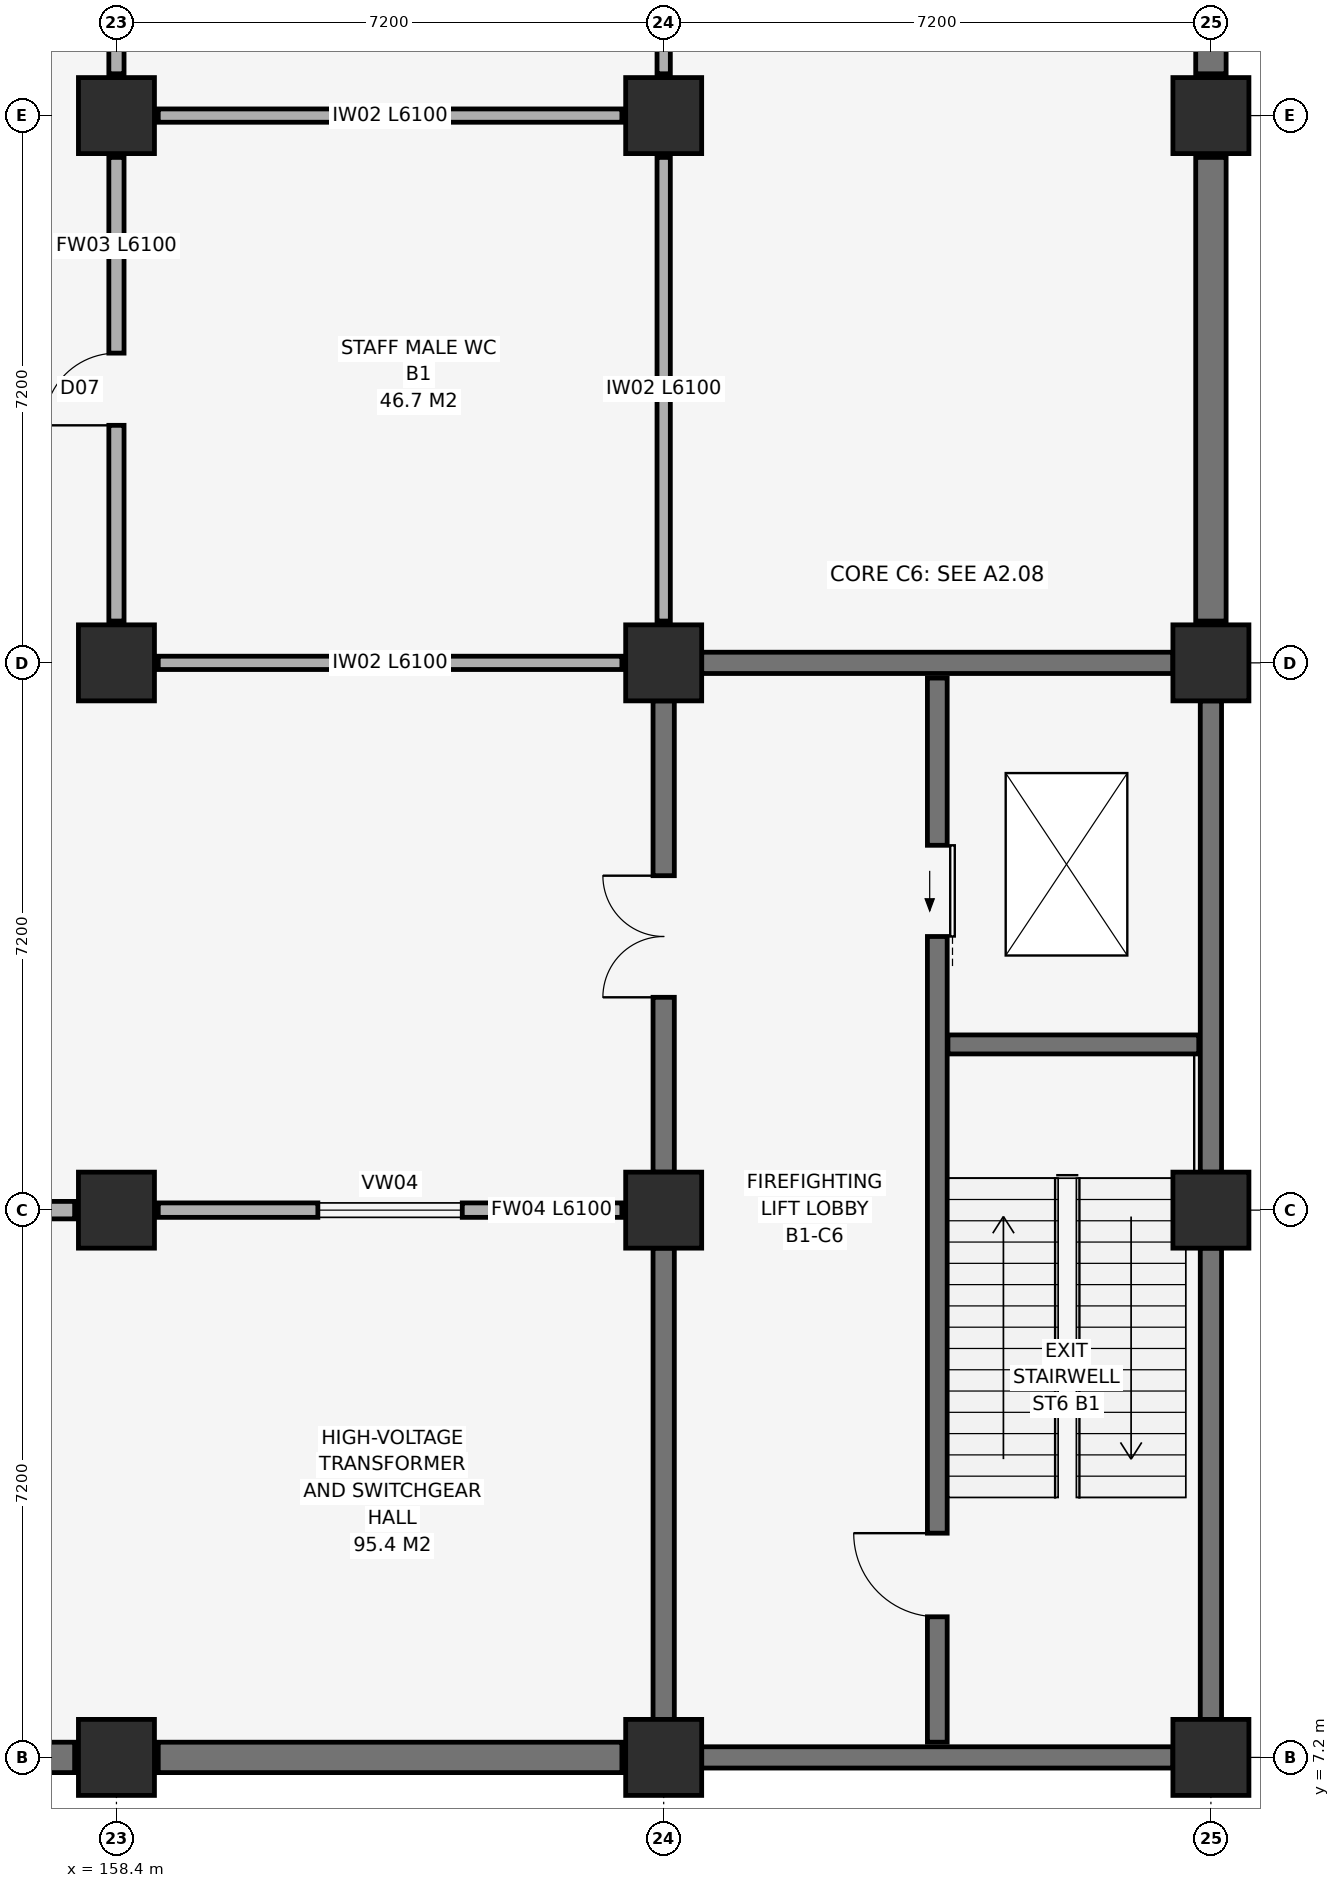
"""IFC4 building model, lengths in metres.
Left out: names, types, materials, properties, quantities, classifications, styles, units other than length and angle.
Written with IfcOpenShell. Run it as: python <this file> out.ifc"""

import sys

from ifc_helpers import new_model, si_unit, direction, frame, frame_2d, origin, origin_2d, place, context, subcontext, project, spatial, rectangle, extrude, element, fill, save


model = new_model("IFC4")
c1 = context("Model", 3, precision=1e-05, world=origin(), true_north=direction((0.0, 1.0)))
c2 = subcontext(c1, "Body", "Model", "MODEL_VIEW")
j1 = project(units=[si_unit("LENGTHUNIT", "METRE"), si_unit("PLANEANGLEUNIT", "RADIAN")], contexts=[c1])
p1 = place(None, origin())
s1 = spatial("IfcSite", under=j1, at=p1, CompositionType="ELEMENT")
p2 = place(p1, origin())
s2 = spatial("IfcBuilding", under=s1, at=p2, CompositionType="ELEMENT")
p3 = place(p2, frame((0.0, 0.0, -5.4)))
s3 = spatial("IfcBuildingStorey", under=s2, at=p3, CompositionType="ELEMENT", Elevation=-5.4)
for number, where, z_axis, x_axis in (
    (1, (158.4, 7.2, -0.45), (0.0, 0.0, 1.0), (1.0, 0.0, 0.0)),
    (2, (158.4, 14.4, -0.45), (0.0, 0.0, 1.0), (1.0, 0.0, 0.0)),
    (3, (158.4, 21.6, -0.45), (0.0, 0.0, 1.0), (1.0, 0.0, 0.0)),
    (4, (158.4, 28.8, -0.45), (0.0, 0.0, 1.0), (1.0, 0.0, 0.0)),
    (5, (165.6, 7.2, -0.45), (0.0, 0.0, 1.0), (1.0, 0.0, 0.0)),
    (6, (165.6, 14.4, -0.45), (0.0, 0.0, 1.0), (1.0, 0.0, 0.0)),
    (7, (165.6, 21.6, -0.45), (0.0, 0.0, 1.0), (1.0, 0.0, 0.0)),
    (8, (165.6, 28.8, -0.45), (0.0, 0.0, 1.0), (1.0, 0.0, 0.0)),
    (9, (172.8, 7.2, -0.45), (0.0, 0.0, 1.0), (1.0, 0.0, 0.0)),
    (10, (172.8, 14.4, -0.45), (0.0, 0.0, 1.0), (1.0, 0.0, 0.0)),
    (11, (172.8, 21.6, -0.45), (0.0, 0.0, 1.0), (1.0, 0.0, 0.0)),
    (12, (172.8, 28.8, -0.45), (0.0, 0.0, 1.0), (1.0, 0.0, 0.0)),
):
    element("IfcColumn", number, at=place(p3, frame(where, z_axis=z_axis, x_axis=x_axis)), inside=s3, PredefinedType="COLUMN", context=c2, shape_type="SweptSolid", body=[
        extrude(rectangle(XDim=1.0, YDim=1.0, at=origin_2d()), origin(), (0.0, 0.0, 1.0), 5.85),
    ])
for number, where, z_axis, x_axis in (
    (13, (151.75, 7.2, 0.0), (0.0, 0.0, 1.0), (1.0, 0.0, 0.0)),
    (14, (158.95, 7.2, 0.0), (0.0, 0.0, 1.0), (1.0, 0.0, 0.0)),
    (15, (172.8, 22.15, 0.0), (0.0, 0.0, 1.0), (0.0, 1.0, 0.0)),
):
    element("IfcWall", number, at=place(p3, frame(where, z_axis=z_axis, x_axis=x_axis)), inside=s3, PredefinedType="USERDEFINED", context=c2, shape_type="SweptSolid", body=[
        extrude(rectangle(XDim=6.1, YDim=0.4, at=frame_2d((3.05, 0.0))), origin(), (0.0, 0.0, 1.0), 5.12),
    ])
p4 = place(p3, frame((172.8, 29.35, 0.0), z_axis=(0.0, 0.0, 1.0), x_axis=(0.0, 1.0, 0.0)))
e16 = element("IfcWall", 16, at=p4, inside=s3, PredefinedType="USERDEFINED", context=c2, shape_type="SweptSolid", body=[
    extrude(rectangle(XDim=6.1, YDim=0.4, at=frame_2d((3.05, 0.0))), origin(), (0.0, 0.0, 1.0), 5.12),
])
for number, where, z_axis, x_axis in (
    (17, (166.1, 7.2, 0.0), (0.0, 0.0, 1.0), (1.0, 0.0, 0.0)),
    (18, (166.1, 21.6, 0.0), (0.0, 0.0, 1.0), (1.0, 0.0, 0.0)),
    (19, (165.6, 7.7, 0.0), (0.0, 0.0, 1.0), (0.0, 1.0, 0.0)),
):
    element("IfcWall", number, at=place(p3, frame(where, z_axis=z_axis, x_axis=x_axis)), inside=s3, PredefinedType="SHEAR", context=c2, shape_type="SweptSolid", body=[
        extrude(rectangle(XDim=6.2, YDim=0.28, at=frame_2d((3.1, 0.0))), origin(), (0.0, 0.0, 1.0), 5.12),
    ])
p5 = place(p3, frame((165.6, 14.9, 0.0), z_axis=(0.0, 0.0, 1.0), x_axis=(0.0, 1.0, 0.0)))
e20 = element("IfcWall", 20, at=p5, inside=s3, PredefinedType="SHEAR", context=c2, shape_type="SweptSolid", body=[
    extrude(rectangle(XDim=6.2, YDim=0.28, at=frame_2d((3.1, 0.0))), origin(), (0.0, 0.0, 1.0), 5.12),
])
p6 = place(p5, frame((2.3, 0.0, 0.0)))
e21 = element("IfcOpeningElement", 21, at=p6, cuts=e20, PredefinedType="OPENING", context=c2, shape_type="SweptSolid", body=[
    extrude(rectangle(XDim=1.6, YDim=2.2, at=frame_2d((0.8, 1.1))), frame((0.0, 0.155, 0.0), z_axis=(0.0, -1.0, 0.0), x_axis=(1.0, 0.0, 0.0)), (0.0, 0.0, 1.0), 0.31),
])
p7 = place(p3, frame((172.8, 7.7, 0.0), z_axis=(0.0, 0.0, 1.0), x_axis=(0.0, 1.0, 0.0)))
e22 = element("IfcWall", 22, at=p7, inside=s3, PredefinedType="SHEAR", context=c2, shape_type="SweptSolid", body=[
    extrude(rectangle(XDim=6.2, YDim=0.28, at=frame_2d((3.1, 0.0))), origin(), (0.0, 0.0, 1.0), 5.12),
])
p8 = place(p3, frame((172.8, 14.9, 0.0), z_axis=(0.0, 0.0, 1.0), x_axis=(0.0, 1.0, 0.0)))
e23 = element("IfcWall", 23, at=p8, inside=s3, PredefinedType="SHEAR", context=c2, shape_type="SweptSolid", body=[
    extrude(rectangle(XDim=6.2, YDim=0.28, at=frame_2d((3.1, 0.0))), origin(), (0.0, 0.0, 1.0), 5.12),
])
p9 = place(p3, frame((169.2, 7.4, 0.0), z_axis=(0.0, 0.0, 1.0), x_axis=(0.0, 1.0, 0.0)))
e24 = element("IfcWall", 24, at=p9, inside=s3, PredefinedType="SHEAR", context=c2, shape_type="SweptSolid", body=[
    extrude(rectangle(XDim=14.0, YDim=0.26, at=frame_2d((7.0, 0.0))), origin(), (0.0, 0.0, 1.0), 5.12),
])
p10 = place(p9, frame((1.65, 0.0, 0.0)))
e25 = element("IfcOpeningElement", 25, at=p10, cuts=e24, PredefinedType="OPENING", context=c2, shape_type="SweptSolid", body=[
    extrude(rectangle(XDim=1.1, YDim=2.15, at=frame_2d((0.55, 1.075))), frame((0.0, 0.145, 0.0), z_axis=(0.0, -1.0, 0.0), x_axis=(1.0, 0.0, 0.0)), (0.0, 0.0, 1.0), 0.29),
])
p11 = place(p9, frame((10.6, 0.0, 0.0)))
e26 = element("IfcOpeningElement", 26, at=p11, cuts=e24, PredefinedType="OPENING", context=c2, shape_type="SweptSolid", body=[
    extrude(rectangle(XDim=1.2, YDim=2.25, at=frame_2d((0.6, 1.125))), frame((0.0, 0.145, 0.0), z_axis=(0.0, -1.0, 0.0), x_axis=(1.0, 0.0, 0.0)), (0.0, 0.0, 1.0), 0.29),
])
p12 = place(p3, frame((169.34, 16.58, 0.0), z_axis=(0.0, 0.0, 1.0), x_axis=(1.0, 0.0, 0.0)))
e27 = element("IfcWall", 27, at=p12, inside=s3, PredefinedType="SHEAR", context=c2, shape_type="SweptSolid", body=[
    extrude(rectangle(XDim=3.3, YDim=0.25, at=frame_2d((1.65, 0.0))), origin(), (0.0, 0.0, 1.0), 5.12),
])
p13 = place(p3, frame((151.75, 14.4, 0.0), z_axis=(0.0, 0.0, 1.0), x_axis=(1.0, 0.0, 0.0)))
e28 = element("IfcWall", 28, at=p13, inside=s3, PredefinedType="SOLIDWALL", context=c2, shape_type="SweptSolid", body=[
    extrude(rectangle(XDim=6.1, YDim=0.23, at=frame_2d((3.05, 0.0))), origin(), (0.0, 0.0, 1.0), 4.17),
])
p14 = place(p13, frame((2.1, 0.0, 0.0)))
e29 = element("IfcOpeningElement", 29, at=p14, cuts=e28, PredefinedType="OPENING", context=c2, shape_type="SweptSolid", body=[
    extrude(rectangle(XDim=1.9, YDim=2.35, at=frame_2d((0.95, 1.175))), frame((0.0, 0.13, 0.0), z_axis=(0.0, -1.0, 0.0), x_axis=(1.0, 0.0, 0.0)), (0.0, 0.0, 1.0), 0.26),
])
p15 = place(p3, frame((158.95, 14.4, 0.0), z_axis=(0.0, 0.0, 1.0), x_axis=(1.0, 0.0, 0.0)))
e30 = element("IfcWall", 30, at=p15, inside=s3, PredefinedType="SOLIDWALL", context=c2, shape_type="SweptSolid", body=[
    extrude(rectangle(XDim=6.1, YDim=0.19, at=frame_2d((3.05, 0.0))), origin(), (0.0, 0.0, 1.0), 4.17),
])
p16 = place(p15, frame((2.1, 0.0, 0.95)))
e31 = element("IfcOpeningElement", 31, at=p16, cuts=e30, PredefinedType="OPENING", context=c2, shape_type="SweptSolid", body=[
    extrude(rectangle(XDim=1.9, YDim=1.5, at=frame_2d((0.95, 0.75))), frame((0.0, 0.11, 0.0), z_axis=(0.0, -1.0, 0.0), x_axis=(1.0, 0.0, 0.0)), (0.0, 0.0, 1.0), 0.22),
])
for number, where, z_axis, x_axis in (
    (32, (158.95, 21.6, 0.0), (0.0, 0.0, 1.0), (1.0, 0.0, 0.0)),
    (33, (158.95, 28.8, 0.0), (0.0, 0.0, 1.0), (1.0, 0.0, 0.0)),
):
    element("IfcWall", number, at=place(p3, frame(where, z_axis=z_axis, x_axis=x_axis)), inside=s3, PredefinedType="PARTITIONING", context=c2, shape_type="SweptSolid", body=[
        extrude(rectangle(XDim=6.1, YDim=0.175, at=frame_2d((3.05, 0.0))), origin(), (0.0, 0.0, 1.0), 4.17),
    ])
p17 = place(p3, frame((158.4, 22.15, 0.0), z_axis=(0.0, 0.0, 1.0), x_axis=(0.0, 1.0, 0.0)))
e34 = element("IfcWall", 34, at=p17, inside=s3, PredefinedType="SOLIDWALL", context=c2, shape_type="SweptSolid", body=[
    extrude(rectangle(XDim=6.1, YDim=0.2, at=frame_2d((3.05, 0.0))), origin(), (0.0, 0.0, 1.0), 4.37),
])
p18 = place(p17, frame((2.575, 0.0, 0.0)))
e35 = element("IfcOpeningElement", 35, at=p18, cuts=e34, PredefinedType="OPENING", context=c2, shape_type="SweptSolid", body=[
    extrude(rectangle(XDim=0.95, YDim=2.1, at=frame_2d((0.475, 1.05))), frame((0.0, 0.115, 0.0), z_axis=(0.0, -1.0, 0.0), x_axis=(1.0, 0.0, 0.0)), (0.0, 0.0, 1.0), 0.23),
])
p19 = place(p3, frame((165.6, 22.15, 0.0), z_axis=(0.0, 0.0, 1.0), x_axis=(0.0, 1.0, 0.0)))
e36 = element("IfcWall", 36, at=p19, inside=s3, PredefinedType="PARTITIONING", context=c2, shape_type="SweptSolid", body=[
    extrude(rectangle(XDim=6.1, YDim=0.175, at=frame_2d((3.05, 0.0))), origin(), (0.0, 0.0, 1.0), 4.37),
])
p20 = place(p3, frame((158.4, 29.35, 0.0), z_axis=(0.0, 0.0, 1.0), x_axis=(0.0, 1.0, 0.0)))
e37 = element("IfcWall", 37, at=p20, inside=s3, PredefinedType="SOLIDWALL", context=c2, shape_type="SweptSolid", body=[
    extrude(rectangle(XDim=6.1, YDim=0.2, at=frame_2d((3.05, 0.0))), origin(), (0.0, 0.0, 1.0), 4.37),
])
p21 = place(p20, frame((2.59, 0.0, 0.0)))
e38 = element("IfcOpeningElement", 38, at=p21, cuts=e37, PredefinedType="OPENING", context=c2, shape_type="SweptSolid", body=[
    extrude(rectangle(XDim=0.92, YDim=2.1, at=frame_2d((0.46, 1.05))), frame((0.0, 0.115, 0.0), z_axis=(0.0, -1.0, 0.0), x_axis=(1.0, 0.0, 0.0)), (0.0, 0.0, 1.0), 0.23),
])
p22 = place(p3, frame((165.6, 29.35, 0.0), z_axis=(0.0, 0.0, 1.0), x_axis=(0.0, 1.0, 0.0)))
e39 = element("IfcWall", 39, at=p22, inside=s3, PredefinedType="PARTITIONING", context=c2, shape_type="SweptSolid", body=[
    extrude(rectangle(XDim=6.1, YDim=0.175, at=frame_2d((3.05, 0.0))), origin(), (0.0, 0.0, 1.0), 4.37),
])
p23 = place(p10, frame((1.1, 0.0, 0.0), z_axis=(0.0, 0.0, 1.0), x_axis=(-1.0, 0.0, 0.0)))
e40 = element("IfcDoor", 40, at=p23, inside=s3, OperationType="SINGLE_SWING_LEFT", PredefinedType="DOOR", context=c2, shape_type="SweptSolid", body=[
    extrude(rectangle(XDim=1.1, YDim=2.15, at=frame_2d((0.55, 1.075))), frame((0.0, 0.025, 0.0), z_axis=(0.0, -1.0, 0.0), x_axis=(1.0, 0.0, 0.0)), (0.0, 0.0, 1.0), 0.05),
])
fill(e25, e40)
p24 = place(p11, origin())
e41 = element("IfcDoor", 41, at=p24, inside=s3, OperationType="SLIDING_TO_LEFT", PredefinedType="DOOR", context=c2, shape_type="SweptSolid", body=[
    extrude(rectangle(XDim=1.2, YDim=2.25, at=frame_2d((0.6, 1.125))), frame((0.0, 0.025, 0.0), z_axis=(0.0, -1.0, 0.0), x_axis=(1.0, 0.0, 0.0)), (0.0, 0.0, 1.0), 0.05),
])
fill(e26, e41)
p25 = place(p6, origin())
e42 = element("IfcDoor", 42, at=p25, inside=s3, OperationType="DOUBLE_SWING_LEFT", PredefinedType="DOOR", context=c2, shape_type="SweptSolid", body=[
    extrude(rectangle(XDim=1.6, YDim=2.2, at=frame_2d((0.8, 1.1))), frame((0.0, 0.025, 0.0), z_axis=(0.0, -1.0, 0.0), x_axis=(1.0, 0.0, 0.0)), (0.0, 0.0, 1.0), 0.05),
])
fill(e21, e42)
p26 = place(p16, origin())
e43 = element("IfcWindow", 43, at=p26, inside=s3, PartitioningType="SINGLE_PANEL", PredefinedType="WINDOW", context=c2, shape_type="SweptSolid", body=[
    extrude(rectangle(XDim=1.9, YDim=1.5, at=frame_2d((0.95, 0.75))), frame((0.0, 0.03, 0.0), z_axis=(0.0, -1.0, 0.0), x_axis=(1.0, 0.0, 0.0)), (0.0, 0.0, 1.0), 0.06),
])
fill(e31, e43)
p27 = place(p18, frame((0.95, 0.0, 0.0), z_axis=(0.0, 0.0, 1.0), x_axis=(-1.0, 0.0, 0.0)))
e44 = element("IfcDoor", 44, at=p27, inside=s3, OperationType="SINGLE_SWING_RIGHT", PredefinedType="DOOR", context=c2, shape_type="SweptSolid", body=[
    extrude(rectangle(XDim=0.95, YDim=2.1, at=frame_2d((0.475, 1.05))), frame((0.0, 0.025, 0.0), z_axis=(0.0, -1.0, 0.0), x_axis=(1.0, 0.0, 0.0)), (0.0, 0.0, 1.0), 0.05),
])
fill(e35, e44)
save(model, sys.argv[1])
